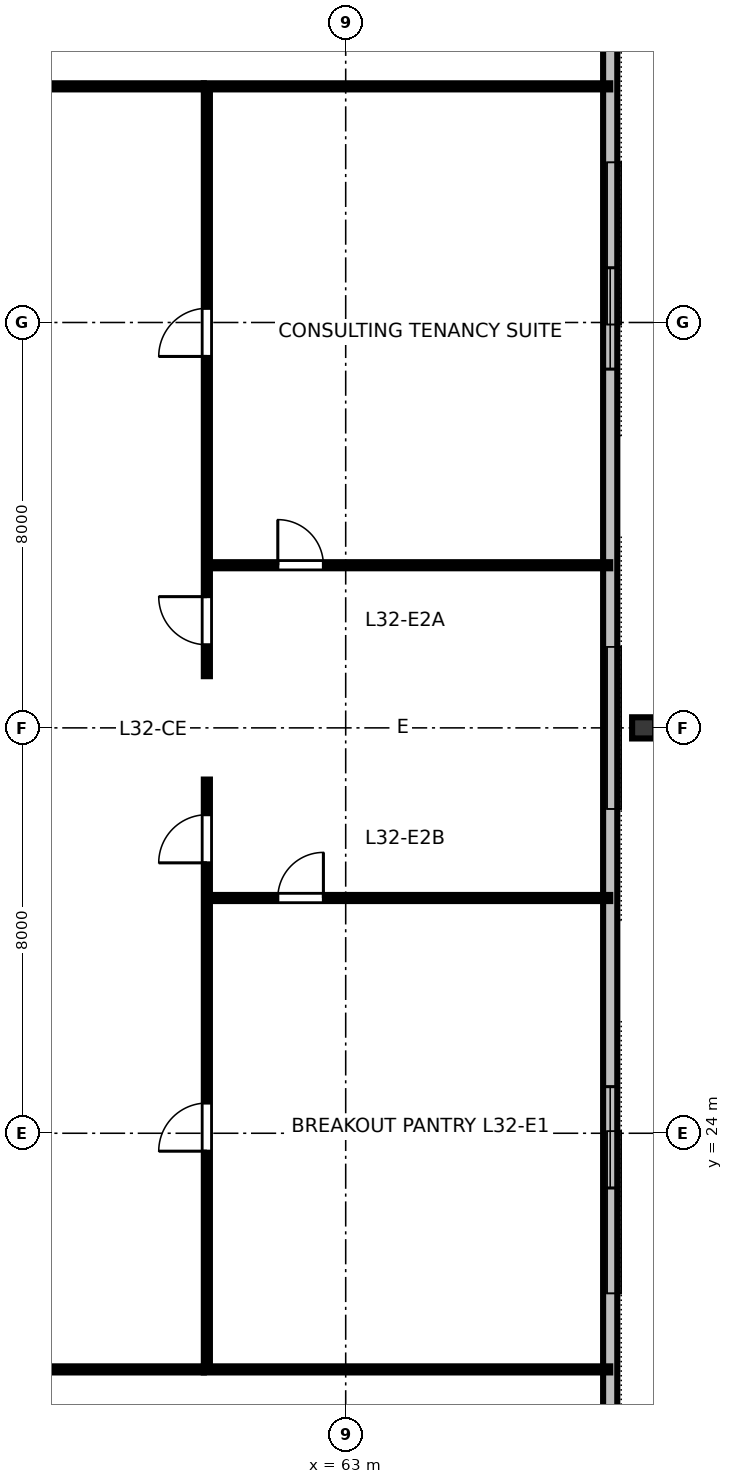
"""IFC4 building model, lengths in metres.
Left out: names, types, materials, properties, quantities, classifications, styles, units other than length and angle.
Written with IfcOpenShell. Run it as: python <this file> out.ifc"""

import sys

from ifc_helpers import new_model, si_unit, direction, frame, frame_2d, origin, origin_2d, place, context, subcontext, project, spatial, rectangle, i_section, extrude, element, fill, save


model = new_model("IFC4")
c1 = context("Model", 3, precision=1e-05, world=origin(), true_north=direction((0.0, 1.0)))
c2 = subcontext(c1, "Body", "Model", "MODEL_VIEW")
j1 = project(units=[si_unit("LENGTHUNIT", "METRE"), si_unit("PLANEANGLEUNIT", "RADIAN")], contexts=[c1])
p1 = place(None, origin())
s1 = spatial("IfcSite", under=j1, at=p1, CompositionType="ELEMENT")
p2 = place(p1, origin())
s2 = spatial("IfcBuilding", under=s1, at=p2, CompositionType="ELEMENT")
p3 = place(p2, frame((0.0, 0.0, 124.0)))
s3 = spatial("IfcBuildingStorey", under=s2, at=p3, CompositionType="ELEMENT", Elevation=124.0)
p4 = place(p3, frame((68.88, 32.0, 0.0), z_axis=(0.089001216718, 0.0, 0.996031517284), x_axis=(-0.996031517284, 0.0, 0.089001216718)))
e1 = element("IfcColumn", 1, at=p4, inside=s3, PredefinedType="COLUMN", context=c2, shape_type="SweptSolid", body=[
    extrude(i_section(OverallWidth=0.418, OverallDepth=0.455, WebThickness=0.042, FlangeThickness=0.068, FilletRadius=0.025, at=origin_2d()), origin(), (0.0, 0.0, 1.0), 3.371),
])
p5 = place(p3, frame((68.22, 16.76, 0.0), z_axis=(0.0, 0.0, 1.0), x_axis=(0.0, 1.0, 0.0)))
e2 = element("IfcWall", 2, at=p5, inside=s3, PredefinedType="STANDARD", context=c2, shape_type="SweptSolid", body=[
    extrude(rectangle(XDim=30.48, YDim=0.28, at=frame_2d((15.24, 0.0))), origin(), (0.0, 0.0, 1.0), 3.36),
])
p6 = place(p5, frame((6.16, 0.0, 0.8)))
e3 = element("IfcOpeningElement", 3, at=p6, cuts=e2, PredefinedType="OPENING", context=c2, shape_type="SweptSolid", body=[
    extrude(rectangle(XDim=2.0, YDim=1.95, at=frame_2d((1.0, 0.975))), frame((0.0, 0.15, 0.0), z_axis=(0.0, -1.0, 0.0), x_axis=(1.0, 0.0, 0.0)), (0.0, 0.0, 1.0), 0.3),
])
p7 = place(p5, frame((22.32, 0.0, 0.8)))
e4 = element("IfcOpeningElement", 4, at=p7, cuts=e2, PredefinedType="OPENING", context=c2, shape_type="SweptSolid", body=[
    extrude(rectangle(XDim=2.0, YDim=1.95, at=frame_2d((1.0, 0.975))), frame((0.0, 0.15, 0.0), z_axis=(0.0, -1.0, 0.0), x_axis=(1.0, 0.0, 0.0)), (0.0, 0.0, 1.0), 0.3),
])
p8 = place(p3, frame((31.8, 19.34, 0.0), z_axis=(0.0, 0.0, 1.0), x_axis=(1.0, 0.0, 0.0)))
e5 = element("IfcWall", 5, at=p8, inside=s3, PredefinedType="PARTITIONING", context=c2, shape_type="SweptSolid", body=[
    extrude(rectangle(XDim=28.4, YDim=0.12, at=frame_2d((14.2, 0.0))), origin(), (0.0, 0.0, 1.0), 2.64),
])
p9 = place(p8, frame((7.878, 0.0, 0.0)))
e6 = element("IfcOpeningElement", 6, at=p9, cuts=e5, PredefinedType="OPENING", context=c2, shape_type="SweptSolid", body=[
    extrude(rectangle(XDim=0.95, YDim=2.15, at=frame_2d((0.475, 1.075))), frame((0.0, 0.07, 0.0), z_axis=(0.0, -1.0, 0.0), x_axis=(1.0, 0.0, 0.0)), (0.0, 0.0, 1.0), 0.14),
])
p10 = place(p8, frame((21.938, 0.0, 0.0)))
e7 = element("IfcOpeningElement", 7, at=p10, cuts=e5, PredefinedType="OPENING", context=c2, shape_type="SweptSolid", body=[
    extrude(rectangle(XDim=0.95, YDim=2.15, at=frame_2d((0.475, 1.075))), frame((0.0, 0.07, 0.0), z_axis=(0.0, -1.0, 0.0), x_axis=(1.0, 0.0, 0.0)), (0.0, 0.0, 1.0), 0.14),
])
p11 = place(p3, frame((31.8, 44.66, 0.0), z_axis=(0.0, 0.0, 1.0), x_axis=(1.0, 0.0, 0.0)))
e8 = element("IfcWall", 8, at=p11, inside=s3, PredefinedType="PARTITIONING", context=c2, shape_type="SweptSolid", body=[
    extrude(rectangle(XDim=28.4, YDim=0.12, at=frame_2d((14.2, 0.0))), origin(), (0.0, 0.0, 1.0), 2.64),
])
p12 = place(p11, frame((4.747, 0.0, 0.0)))
e9 = element("IfcOpeningElement", 9, at=p12, cuts=e8, PredefinedType="OPENING", context=c2, shape_type="SweptSolid", body=[
    extrude(rectangle(XDim=0.95, YDim=2.15, at=frame_2d((0.475, 1.075))), frame((0.0, 0.07, 0.0), z_axis=(0.0, -1.0, 0.0), x_axis=(1.0, 0.0, 0.0)), (0.0, 0.0, 1.0), 0.14),
])
p13 = place(p11, frame((18.807, 0.0, 0.0)))
e10 = element("IfcOpeningElement", 10, at=p13, cuts=e8, PredefinedType="OPENING", context=c2, shape_type="SweptSolid", body=[
    extrude(rectangle(XDim=0.95, YDim=2.15, at=frame_2d((0.475, 1.075))), frame((0.0, 0.07, 0.0), z_axis=(0.0, -1.0, 0.0), x_axis=(1.0, 0.0, 0.0)), (0.0, 0.0, 1.0), 0.14),
])
p14 = place(p3, frame((60.26, 28.643, 0.0), z_axis=(0.0, 0.0, 1.0), x_axis=(1.0, 0.0, 0.0)))
e11 = element("IfcWall", 11, at=p14, inside=s3, PredefinedType="PARTITIONING", context=c2, shape_type="SweptSolid", body=[
    extrude(rectangle(XDim=7.96, YDim=0.12, at=frame_2d((3.98, 0.0))), origin(), (0.0, 0.0, 1.0), 2.64),
])
p15 = place(p14, frame((1.4, 0.0, 0.0)))
e12 = element("IfcOpeningElement", 12, at=p15, cuts=e11, PredefinedType="OPENING", context=c2, shape_type="SweptSolid", body=[
    extrude(rectangle(XDim=0.9, YDim=2.15, at=frame_2d((0.45, 1.075))), frame((0.0, 0.07, 0.0), z_axis=(0.0, -1.0, 0.0), x_axis=(1.0, 0.0, 0.0)), (0.0, 0.0, 1.0), 0.14),
])
p16 = place(p3, frame((60.26, 35.209, 0.0), z_axis=(0.0, 0.0, 1.0), x_axis=(1.0, 0.0, 0.0)))
e13 = element("IfcWall", 13, at=p16, inside=s3, PredefinedType="PARTITIONING", context=c2, shape_type="SweptSolid", body=[
    extrude(rectangle(XDim=7.96, YDim=0.12, at=frame_2d((3.98, 0.0))), origin(), (0.0, 0.0, 1.0), 2.64),
])
p17 = place(p16, frame((1.4, 0.0, 0.0)))
e14 = element("IfcOpeningElement", 14, at=p17, cuts=e13, PredefinedType="OPENING", context=c2, shape_type="SweptSolid", body=[
    extrude(rectangle(XDim=0.9, YDim=2.15, at=frame_2d((0.45, 1.075))), frame((0.0, 0.07, 0.0), z_axis=(0.0, -1.0, 0.0), x_axis=(1.0, 0.0, 0.0)), (0.0, 0.0, 1.0), 0.14),
])
p18 = place(p3, frame((60.26, 19.4, 0.0), z_axis=(0.0, 0.0, 1.0), x_axis=(0.0, 1.0, 0.0)))
e15 = element("IfcWall", 15, at=p18, inside=s3, PredefinedType="PARTITIONING", context=c2, shape_type="SweptSolid", body=[
    extrude(rectangle(XDim=11.58, YDim=0.12, at=frame_2d((5.79, 0.0))), origin(), (0.0, 0.0, 1.0), 2.64),
])
p19 = place(p18, frame((4.246, 0.0, 0.0)))
e16 = element("IfcOpeningElement", 16, at=p19, cuts=e15, PredefinedType="OPENING", context=c2, shape_type="SweptSolid", body=[
    extrude(rectangle(XDim=0.95, YDim=2.15, at=frame_2d((0.475, 1.075))), frame((0.0, 0.07, 0.0), z_axis=(0.0, -1.0, 0.0), x_axis=(1.0, 0.0, 0.0)), (0.0, 0.0, 1.0), 0.14),
])
p20 = place(p18, frame((9.936, 0.0, 0.0)))
e17 = element("IfcOpeningElement", 17, at=p20, cuts=e15, PredefinedType="OPENING", context=c2, shape_type="SweptSolid", body=[
    extrude(rectangle(XDim=0.95, YDim=2.15, at=frame_2d((0.475, 1.075))), frame((0.0, 0.07, 0.0), z_axis=(0.0, -1.0, 0.0), x_axis=(1.0, 0.0, 0.0)), (0.0, 0.0, 1.0), 0.14),
])
p21 = place(p3, frame((60.26, 33.02, 0.0), z_axis=(0.0, 0.0, 1.0), x_axis=(0.0, 1.0, 0.0)))
e18 = element("IfcWall", 18, at=p21, inside=s3, PredefinedType="PARTITIONING", context=c2, shape_type="SweptSolid", body=[
    extrude(rectangle(XDim=11.58, YDim=0.12, at=frame_2d((5.79, 0.0))), origin(), (0.0, 0.0, 1.0), 2.64),
])
p22 = place(p21, frame((0.62, 0.0, 0.0)))
e19 = element("IfcOpeningElement", 19, at=p22, cuts=e18, PredefinedType="OPENING", context=c2, shape_type="SweptSolid", body=[
    extrude(rectangle(XDim=0.95, YDim=2.15, at=frame_2d((0.475, 1.075))), frame((0.0, 0.07, 0.0), z_axis=(0.0, -1.0, 0.0), x_axis=(1.0, 0.0, 0.0)), (0.0, 0.0, 1.0), 0.14),
])
p23 = place(p21, frame((6.31, 0.0, 0.0)))
e20 = element("IfcOpeningElement", 20, at=p23, cuts=e18, PredefinedType="OPENING", context=c2, shape_type="SweptSolid", body=[
    extrude(rectangle(XDim=0.95, YDim=2.15, at=frame_2d((0.475, 1.075))), frame((0.0, 0.07, 0.0), z_axis=(0.0, -1.0, 0.0), x_axis=(1.0, 0.0, 0.0)), (0.0, 0.0, 1.0), 0.14),
])
for number, where, z_axis, x_axis in (
    (21, (60.2, 19.34, 0.0), (0.0, 0.0, 1.0), (1.0, 0.0, 0.0)),
    (22, (60.2, 44.66, 0.0), (0.0, 0.0, 1.0), (1.0, 0.0, 0.0)),
):
    element("IfcWall", number, at=place(p3, frame(where, z_axis=z_axis, x_axis=x_axis)), inside=s3, PredefinedType="PARTITIONING", context=c2, shape_type="SweptSolid", body=[
        extrude(rectangle(XDim=8.02, YDim=0.12, at=frame_2d((4.01, 0.0))), origin(), (0.0, 0.0, 1.0), 2.64),
    ])
p24 = place(p6, origin())
e23 = element("IfcWindow", 23, at=p24, inside=s3, PartitioningType="SINGLE_PANEL", PredefinedType="WINDOW", context=c2, shape_type="SweptSolid", body=[
    extrude(rectangle(XDim=2.0, YDim=1.95, at=frame_2d((1.0, 0.975))), frame((0.0, 0.03, 0.0), z_axis=(0.0, -1.0, 0.0), x_axis=(1.0, 0.0, 0.0)), (0.0, 0.0, 1.0), 0.06),
])
fill(e3, e23)
p25 = place(p7, origin())
e24 = element("IfcWindow", 24, at=p25, inside=s3, PartitioningType="SINGLE_PANEL", PredefinedType="WINDOW", context=c2, shape_type="SweptSolid", body=[
    extrude(rectangle(XDim=2.0, YDim=1.95, at=frame_2d((1.0, 0.975))), frame((0.0, 0.03, 0.0), z_axis=(0.0, -1.0, 0.0), x_axis=(1.0, 0.0, 0.0)), (0.0, 0.0, 1.0), 0.06),
])
fill(e4, e24)
p26 = place(p15, origin())
e25 = element("IfcDoor", 25, at=p26, inside=s3, OperationType="SINGLE_SWING_RIGHT", PredefinedType="DOOR", context=c2, shape_type="SweptSolid", body=[
    extrude(rectangle(XDim=0.9, YDim=2.15, at=frame_2d((0.45, 1.075))), frame((0.0, 0.025, 0.0), z_axis=(0.0, -1.0, 0.0), x_axis=(1.0, 0.0, 0.0)), (0.0, 0.0, 1.0), 0.05),
])
fill(e12, e25)
p27 = place(p17, origin())
e26 = element("IfcDoor", 26, at=p27, inside=s3, OperationType="SINGLE_SWING_LEFT", PredefinedType="DOOR", context=c2, shape_type="SweptSolid", body=[
    extrude(rectangle(XDim=0.9, YDim=2.15, at=frame_2d((0.45, 1.075))), frame((0.0, 0.025, 0.0), z_axis=(0.0, -1.0, 0.0), x_axis=(1.0, 0.0, 0.0)), (0.0, 0.0, 1.0), 0.05),
])
fill(e14, e26)
p28 = place(p19, origin())
e27 = element("IfcDoor", 27, at=p28, inside=s3, OperationType="SINGLE_SWING_LEFT", PredefinedType="DOOR", context=c2, shape_type="SweptSolid", body=[
    extrude(rectangle(XDim=0.95, YDim=2.15, at=frame_2d((0.475, 1.075))), frame((0.0, 0.025, 0.0), z_axis=(0.0, -1.0, 0.0), x_axis=(1.0, 0.0, 0.0)), (0.0, 0.0, 1.0), 0.05),
])
fill(e16, e27)
p29 = place(p20, origin())
e28 = element("IfcDoor", 28, at=p29, inside=s3, OperationType="SINGLE_SWING_LEFT", PredefinedType="DOOR", context=c2, shape_type="SweptSolid", body=[
    extrude(rectangle(XDim=0.95, YDim=2.15, at=frame_2d((0.475, 1.075))), frame((0.0, 0.025, 0.0), z_axis=(0.0, -1.0, 0.0), x_axis=(1.0, 0.0, 0.0)), (0.0, 0.0, 1.0), 0.05),
])
fill(e17, e28)
p30 = place(p22, origin())
e29 = element("IfcDoor", 29, at=p30, inside=s3, OperationType="SINGLE_SWING_RIGHT", PredefinedType="DOOR", context=c2, shape_type="SweptSolid", body=[
    extrude(rectangle(XDim=0.95, YDim=2.15, at=frame_2d((0.475, 1.075))), frame((0.0, 0.025, 0.0), z_axis=(0.0, -1.0, 0.0), x_axis=(1.0, 0.0, 0.0)), (0.0, 0.0, 1.0), 0.05),
])
fill(e19, e29)
p31 = place(p23, origin())
e30 = element("IfcDoor", 30, at=p31, inside=s3, OperationType="SINGLE_SWING_LEFT", PredefinedType="DOOR", context=c2, shape_type="SweptSolid", body=[
    extrude(rectangle(XDim=0.95, YDim=2.15, at=frame_2d((0.475, 1.075))), frame((0.0, 0.025, 0.0), z_axis=(0.0, -1.0, 0.0), x_axis=(1.0, 0.0, 0.0)), (0.0, 0.0, 1.0), 0.05),
])
fill(e20, e30)
save(model, sys.argv[1])
